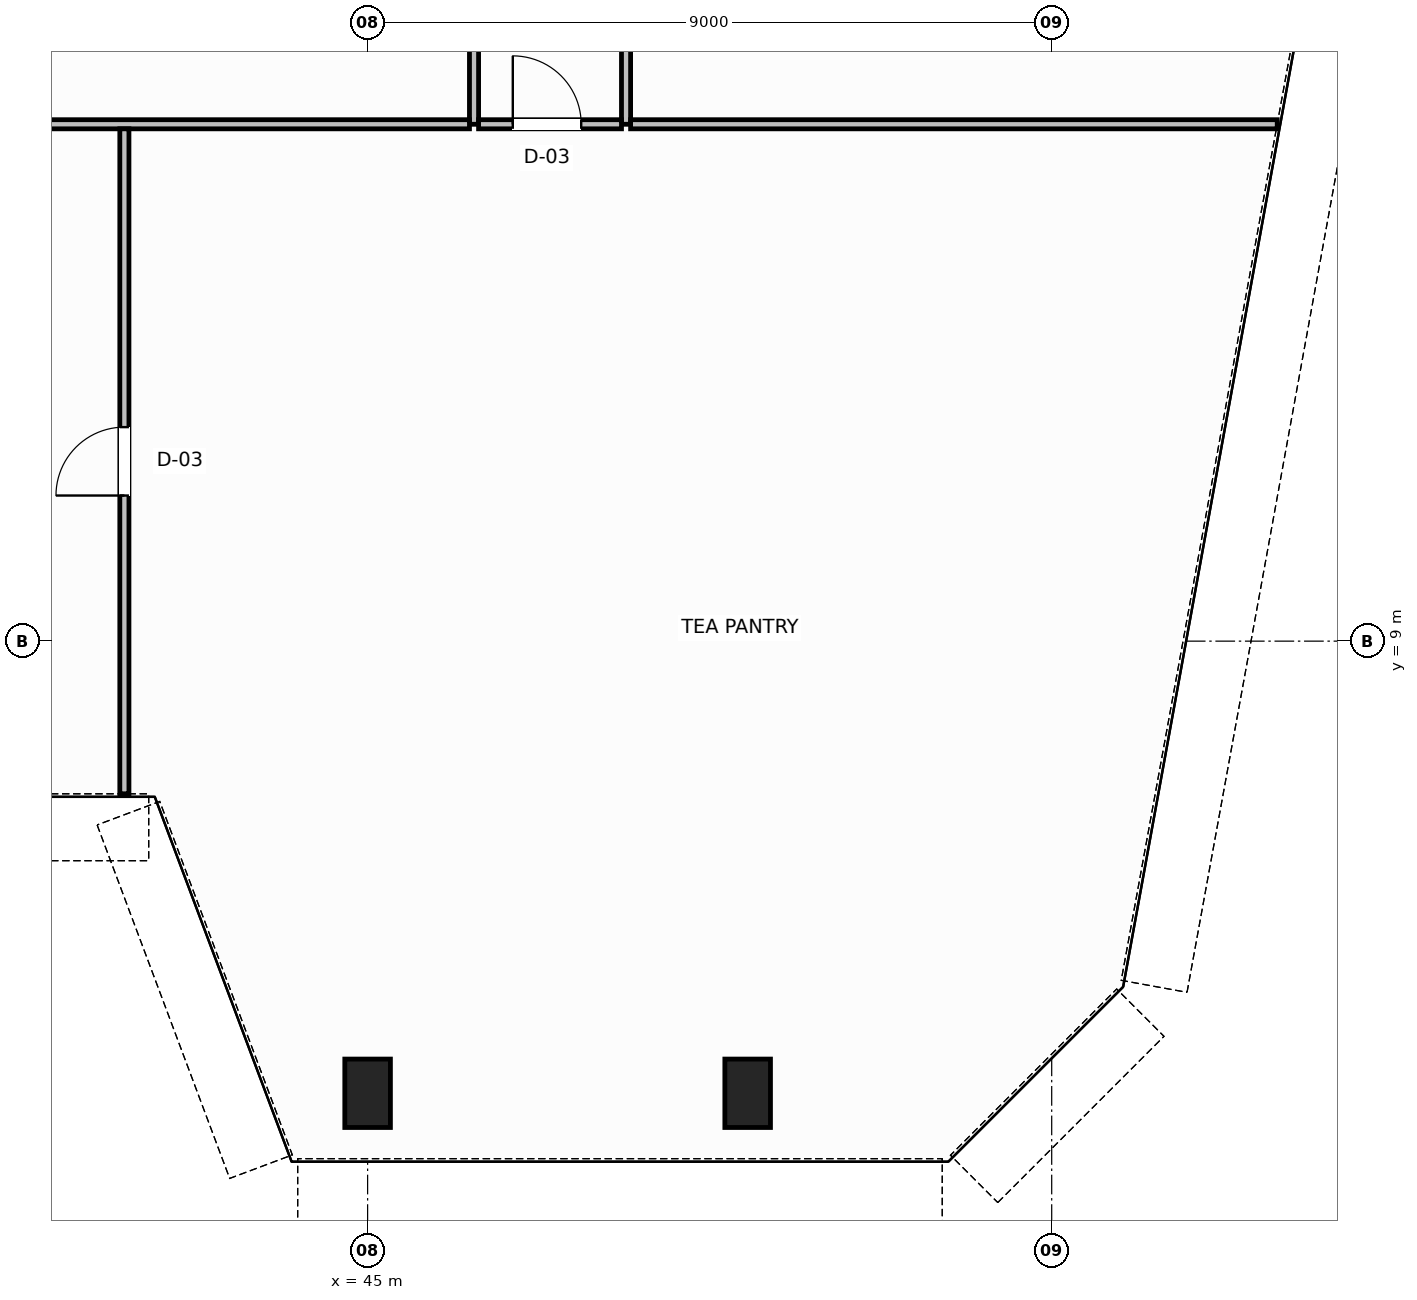
"""IFC4 building model, lengths in metres.
Left out: names, types, materials, properties, quantities, classifications, styles, units other than length and angle.
Written with IfcOpenShell. Run it as: python <this file> out.ifc"""

import sys

from ifc_helpers import new_model, si_unit, direction, frame, frame_2d, origin, origin_2d, place, context, subcontext, project, spatial, rectangle, hollow_rectangle, extrude, source, transform, mapped, element, fill, save


model = new_model("IFC4")
c1 = context("Model", 3, precision=1e-05, world=origin(), true_north=direction((0.0, 1.0)))
c2 = subcontext(c1, "Body", "Model", "MODEL_VIEW")
j1 = project(units=[si_unit("LENGTHUNIT", "METRE"), si_unit("PLANEANGLEUNIT", "RADIAN")], contexts=[c1])
p1 = place(None, origin())
s1 = spatial("IfcSite", under=j1, at=p1, CompositionType="ELEMENT")
p2 = place(p1, origin())
s2 = spatial("IfcBuilding", under=s1, at=p2, CompositionType="ELEMENT")
p3 = place(p2, frame((0.0, 0.0, 53.0)))
s3 = spatial("IfcBuildingStorey", under=s2, at=p3, CompositionType="ELEMENT", Elevation=53.0)
m1 = source(origin(), c2, "Body", "SweptSolid", [
    extrude(hollow_rectangle(XDim=0.6, YDim=0.9, WallThickness=0.04, InnerFilletRadius=0.04, OuterFilletRadius=0.08, at=origin_2d()), origin(), (0.0, 0.0, 1.0), 3.744),
])
for number, where, z_axis, x_axis in (
    (1, (45.0, 3.052, 0.032), (0.0, 0.064, 0.998), (-1.0, 0.0, 0.0)),
    (2, (50.0, 3.052, 0.032), (0.0, 0.064, 0.998), (-1.0, 0.0, 0.0)),
):
    element("IfcColumn", number, at=place(p3, frame(where, z_axis=z_axis, x_axis=x_axis)), inside=s3, PredefinedType="COLUMN", context=c2, shape_type="MappedRepresentation", body=[
        mapped(m1, transform((0.0, 0.0, 0.0), scale=1.0)),
    ])
p4 = place(p3, frame((46.4, 15.8, 0.0), z_axis=(0.0, 0.0, 1.0), x_axis=(0.0, 1.0, 0.0)))
e3 = element("IfcWall", 3, at=p4, inside=s3, PredefinedType="PARTITIONING", context=c2, shape_type="SweptSolid", body=[
    extrude(rectangle(XDim=18.24, YDim=0.12, at=frame_2d((9.12, 0.0))), origin(), (0.0, 0.0, 1.0), 3.58),
])
p5 = place(p3, frame((48.4, 15.8, 0.0), z_axis=(0.0, 0.0, 1.0), x_axis=(0.0, 1.0, 0.0)))
e4 = element("IfcWall", 4, at=p5, inside=s3, PredefinedType="PARTITIONING", context=c2, shape_type="SweptSolid", body=[
    extrude(rectangle(XDim=18.24, YDim=0.12, at=frame_2d((9.12, 0.0))), origin(), (0.0, 0.0, 1.0), 3.58),
])
p6 = place(p5, frame((2.85, 0.0, 0.0)))
e5 = element("IfcOpeningElement", 5, at=p6, cuts=e4, PredefinedType="OPENING", context=c2, shape_type="SweptSolid", body=[
    extrude(rectangle(XDim=0.9, YDim=2.15, at=frame_2d((0.45, 1.075))), frame((0.0, 0.07, 0.0), z_axis=(0.0, -1.0, 0.0), x_axis=(1.0, 0.0, 0.0)), (0.0, 0.0, 1.0), 0.14),
])
p7 = place(p5, frame((10.05, 0.0, 0.0)))
e6 = element("IfcOpeningElement", 6, at=p7, cuts=e4, PredefinedType="OPENING", context=c2, shape_type="SweptSolid", body=[
    extrude(rectangle(XDim=0.9, YDim=2.15, at=frame_2d((0.45, 1.075))), frame((0.0, 0.07, 0.0), z_axis=(0.0, -1.0, 0.0), x_axis=(1.0, 0.0, 0.0)), (0.0, 0.0, 1.0), 0.14),
])
p8 = place(p5, frame((15.87, 0.0, 0.0)))
e7 = element("IfcOpeningElement", 7, at=p8, cuts=e4, PredefinedType="OPENING", context=c2, shape_type="SweptSolid", body=[
    extrude(rectangle(XDim=0.9, YDim=2.15, at=frame_2d((0.45, 1.075))), frame((0.0, 0.07, 0.0), z_axis=(0.0, -1.0, 0.0), x_axis=(1.0, 0.0, 0.0)), (0.0, 0.0, 1.0), 0.14),
])
p9 = place(p3, frame((46.46, 15.8, 0.0), z_axis=(0.0, 0.0, 1.0), x_axis=(1.0, 0.0, 0.0)))
e8 = element("IfcWall", 8, at=p9, inside=s3, PredefinedType="PARTITIONING", context=c2, shape_type="SweptSolid", body=[
    extrude(rectangle(XDim=1.88, YDim=0.12, at=frame_2d((0.94, 0.0))), origin(), (0.0, 0.0, 1.0), 3.58),
])
p10 = place(p9, frame((0.45, 0.0, 0.0)))
e9 = element("IfcOpeningElement", 9, at=p10, cuts=e8, PredefinedType="OPENING", context=c2, shape_type="SweptSolid", body=[
    extrude(rectangle(XDim=0.9, YDim=2.15, at=frame_2d((0.45, 1.075))), frame((0.0, 0.07, 0.0), z_axis=(0.0, -1.0, 0.0), x_axis=(1.0, 0.0, 0.0)), (0.0, 0.0, 1.0), 0.14),
])
p11 = place(p3, frame((48.46, 15.8, 0.0), z_axis=(0.0, 0.0, 1.0), x_axis=(1.0, 0.0, 0.0)))
e10 = element("IfcWall", 10, at=p11, inside=s3, PredefinedType="PARTITIONING", context=c2, shape_type="SweptSolid", body=[
    extrude(rectangle(XDim=8.507, YDim=0.12, at=frame_2d((4.253, 0.0))), origin(), (0.0, 0.0, 1.0), 3.58),
])
p12 = place(p3, frame((21.66, 15.8, 0.0), z_axis=(0.0, 0.0, 1.0), x_axis=(1.0, 0.0, 0.0)))
e11 = element("IfcWall", 11, at=p12, inside=s3, PredefinedType="PARTITIONING", context=c2, shape_type="SweptSolid", body=[
    extrude(rectangle(XDim=24.68, YDim=0.12, at=frame_2d((12.34, 0.0))), origin(), (0.0, 0.0, 1.0), 3.58),
])
p13 = place(p3, frame((41.8, 6.992, 0.0), z_axis=(0.0, 0.0, 1.0), x_axis=(0.0, 1.0, 0.0)))
e12 = element("IfcWall", 12, at=p13, inside=s3, PredefinedType="PARTITIONING", context=c2, shape_type="SweptSolid", body=[
    extrude(rectangle(XDim=8.748, YDim=0.12, at=frame_2d((4.374, 0.0))), origin(), (0.0, 0.0, 1.0), 3.58),
])
p14 = place(p13, frame((3.924, 0.0, 0.0)))
e13 = element("IfcOpeningElement", 13, at=p14, cuts=e12, PredefinedType="OPENING", context=c2, shape_type="SweptSolid", body=[
    extrude(rectangle(XDim=0.9, YDim=2.15, at=frame_2d((0.45, 1.075))), frame((0.0, 0.07, 0.0), z_axis=(0.0, -1.0, 0.0), x_axis=(1.0, 0.0, 0.0)), (0.0, 0.0, 1.0), 0.14),
])
m2 = source(origin(), c2, "Body", "SweptSolid", [
    extrude(rectangle(XDim=0.9, YDim=2.15, at=frame_2d((0.45, 1.075))), frame((0.0, 0.025, 0.0), z_axis=(0.0, -1.0, 0.0), x_axis=(1.0, 0.0, 0.0)), (0.0, 0.0, 1.0), 0.05),
])
p15 = place(p14, origin())
e14 = element("IfcDoor", 14, at=p15, inside=s3, OperationType="SINGLE_SWING_LEFT", PredefinedType="DOOR", context=c2, shape_type="MappedRepresentation", body=[
    mapped(m2, transform((0.0, 0.0, 0.0), scale=1.0)),
])
fill(e13, e14)
p16 = place(p10, origin())
e15 = element("IfcDoor", 15, at=p16, inside=s3, OperationType="SINGLE_SWING_RIGHT", PredefinedType="DOOR", context=c2, shape_type="MappedRepresentation", body=[
    mapped(m2, transform((0.0, 0.0, 0.0), scale=1.0)),
])
fill(e9, e15)
save(model, sys.argv[1])
